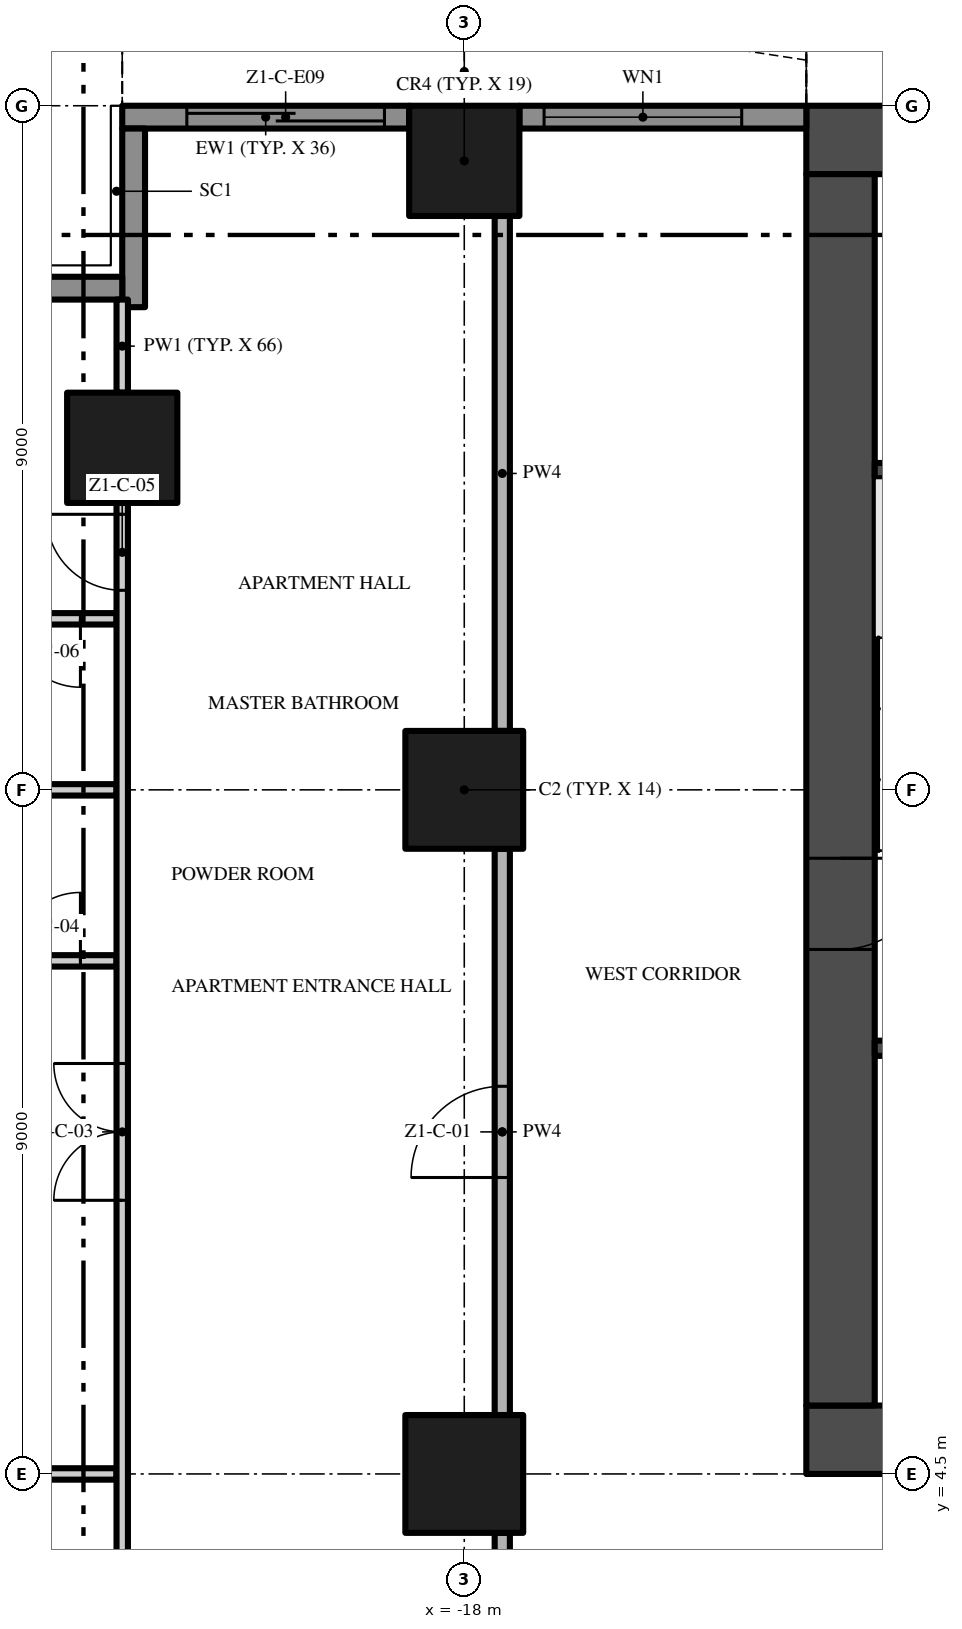
"""IFC4 building model, lengths in metres.
Left out: names, types, materials, properties, quantities, classifications, styles, units other than length and angle.
Written with IfcOpenShell. Run it as: python <this file> out.ifc"""

import sys

from ifc_helpers import new_model, si_unit, direction, frame, frame_2d, origin, origin_2d, place, context, subcontext, project, spatial, polyline, rectangle, outline, extrude, element, fill, save


model = new_model("IFC4")
c1 = context("Model", 3, precision=1e-05, world=origin(), true_north=direction((0.0, 1.0)))
c2 = subcontext(c1, "Body", "Model", "MODEL_VIEW")
j1 = project(units=[si_unit("LENGTHUNIT", "METRE"), si_unit("PLANEANGLEUNIT", "RADIAN")], contexts=[c1])
p1 = place(None, origin())
s1 = spatial("IfcSite", under=j1, at=p1, CompositionType="ELEMENT")
p2 = place(p1, origin())
s2 = spatial("IfcBuilding", under=s1, at=p2, CompositionType="ELEMENT")
p3 = place(p2, frame((0.0, 0.0, 37.8)))
s3 = spatial("IfcBuildingStorey", under=s2, at=p3, CompositionType="ELEMENT", Elevation=37.8)
p4 = place(p3, frame((-13.5, 4.95, -0.3), z_axis=(0.0, 0.0, 1.0), x_axis=(1.0, 0.0, 0.0)))
e1 = element("IfcWall", 1, at=p4, inside=s3, PredefinedType="SHEAR", context=c2, shape_type="SweptSolid", body=[
    extrude(rectangle(XDim=27.0, YDim=0.9, at=frame_2d((13.5, 0.0))), origin(), (0.0, 0.0, 1.0), 3.8),
])
p5 = place(p4, frame((12.0, 0.0, 0.3)))
e2 = element("IfcOpeningElement", 2, at=p5, cuts=e1, PredefinedType="OPENING", context=c2, shape_type="SweptSolid", body=[
    extrude(rectangle(XDim=3.0, YDim=2.4, at=frame_2d((1.5, 1.2))), frame((0.0, 0.46, 0.0), z_axis=(0.0, -1.0, 0.0), x_axis=(1.0, 0.0, 0.0)), (0.0, 0.0, 1.0), 0.92),
])
p6 = place(p4, frame((4.9, 0.0, 0.3)))
e3 = element("IfcOpeningElement", 3, at=p6, cuts=e1, PredefinedType="OPENING", context=c2, shape_type="SweptSolid", body=[
    extrude(rectangle(XDim=1.2, YDim=2.2, at=frame_2d((0.6, 1.1))), frame((0.0, 0.46, 0.0), z_axis=(0.0, -1.0, 0.0), x_axis=(1.0, 0.0, 0.0)), (0.0, 0.0, 1.0), 0.92),
])
p7 = place(p4, frame((20.75, 0.0, 0.3)))
e4 = element("IfcOpeningElement", 4, at=p7, cuts=e1, PredefinedType="OPENING", context=c2, shape_type="SweptSolid", body=[
    extrude(rectangle(XDim=1.5, YDim=2.2, at=frame_2d((0.75, 1.1))), frame((0.0, 0.46, 0.0), z_axis=(0.0, -1.0, 0.0), x_axis=(1.0, 0.0, 0.0)), (0.0, 0.0, 1.0), 0.92),
])
p8 = place(p4, frame((17.4, 0.0, 0.3)))
e5 = element("IfcOpeningElement", 5, at=p8, cuts=e1, PredefinedType="OPENING", context=c2, shape_type="SweptSolid", body=[
    extrude(rectangle(XDim=1.2, YDim=2.2, at=frame_2d((0.6, 1.1))), frame((0.0, 0.46, 0.0), z_axis=(0.0, -1.0, 0.0), x_axis=(1.0, 0.0, 0.0)), (0.0, 0.0, 1.0), 0.92),
])
p9 = place(p3, frame((13.5, 22.05, -0.3), z_axis=(0.0, 0.0, 1.0), x_axis=(-1.0, 0.0, 0.0)))
e6 = element("IfcWall", 6, at=p9, inside=s3, PredefinedType="SHEAR", context=c2, shape_type="SweptSolid", body=[
    extrude(rectangle(XDim=27.0, YDim=0.9, at=frame_2d((13.5, 0.0))), origin(), (0.0, 0.0, 1.0), 3.8),
])
p10 = place(p3, frame((-13.05, 21.6, -0.3), z_axis=(0.0, 0.0, 1.0), x_axis=(0.0, -1.0, 0.0)))
e7 = element("IfcWall", 7, at=p10, inside=s3, PredefinedType="SHEAR", context=c2, shape_type="SweptSolid", body=[
    extrude(rectangle(XDim=16.2, YDim=0.9, at=frame_2d((8.1, 0.0))), origin(), (0.0, 0.0, 1.0), 3.8),
])
p11 = place(p10, frame((9.0, 0.0, 0.3)))
e8 = element("IfcOpeningElement", 8, at=p11, cuts=e7, PredefinedType="OPENING", context=c2, shape_type="SweptSolid", body=[
    extrude(rectangle(XDim=1.2, YDim=2.2, at=frame_2d((0.6, 1.1))), frame((0.0, 0.46, 0.0), z_axis=(0.0, -1.0, 0.0), x_axis=(1.0, 0.0, 0.0)), (0.0, 0.0, 1.0), 0.92),
])
p12 = place(p3, frame((-18.0, 13.5, 0.0), z_axis=(0.0, 0.0, 1.0), x_axis=(1.0, 0.0, 0.0)))
e9 = element("IfcColumn", 9, at=p12, inside=s3, PredefinedType="COLUMN", context=c2, shape_type="SweptSolid", body=[
    extrude(rectangle(XDim=1.55, YDim=1.55, at=origin_2d()), origin(), (0.0, 0.0, 1.0), 3.5),
])
p13 = place(p3, frame((-18.0, 21.775, 0.0), z_axis=(0.0, 0.0, 1.0), x_axis=(1.0, 0.0, 0.0)))
e10 = element("IfcColumn", 10, at=p13, inside=s3, PredefinedType="COLUMN", context=c2, shape_type="SweptSolid", body=[
    extrude(rectangle(XDim=1.45, YDim=1.45, at=origin_2d()), origin(), (0.0, 0.0, 1.0), 3.5),
])
p14 = place(p3, frame((-18.0, 4.5, 0.0), z_axis=(0.0, 0.0, 1.0), x_axis=(1.0, 0.0, 0.0)))
e11 = element("IfcColumn", 11, at=p14, inside=s3, PredefinedType="COLUMN", context=c2, shape_type="SweptSolid", body=[
    extrude(rectangle(XDim=1.55, YDim=1.55, at=origin_2d()), origin(), (0.0, 0.0, 1.0), 3.5),
])
p15 = place(p3, frame((-22.5, 18.0, 0.0), z_axis=(0.0, 0.0, 1.0), x_axis=(1.0, 0.0, 0.0)))
e12 = element("IfcColumn", 12, at=p15, inside=s3, PredefinedType="COLUMN", context=c2, shape_type="SweptSolid", body=[
    extrude(rectangle(XDim=1.45, YDim=1.45, at=origin_2d()), origin(), (0.0, 0.0, 1.0), 3.5),
])
p16 = place(p3, frame((-17.275, 22.35, 0.0), z_axis=(0.0, 0.0, 1.0), x_axis=(1.0, 0.0, 0.0)))
e13 = element("IfcWall", 13, at=p16, inside=s3, PredefinedType="SOLIDWALL", context=c2, shape_type="SweptSolid", body=[
    extrude(rectangle(XDim=3.775, YDim=0.3, at=frame_2d((1.887, 0.0))), origin(), (0.0, 0.0, 1.0), 3.5),
])
p17 = place(p16, frame((0.325, 0.0, 0.45)))
e14 = element("IfcOpeningElement", 14, at=p17, cuts=e13, PredefinedType="OPENING", context=c2, shape_type="SweptSolid", body=[
    extrude(rectangle(XDim=2.6, YDim=2.65, at=frame_2d((1.3, 1.325))), frame((0.0, 0.16, 0.0), z_axis=(0.0, -1.0, 0.0), x_axis=(1.0, 0.0, 0.0)), (0.0, 0.0, 1.0), 0.32),
])
p18 = place(p3, frame((-22.5, 22.35, 0.0), z_axis=(0.0, 0.0, 1.0), x_axis=(1.0, 0.0, 0.0)))
e15 = element("IfcWall", 15, at=p18, inside=s3, PredefinedType="SOLIDWALL", context=c2, shape_type="SweptSolid", body=[
    extrude(rectangle(XDim=3.775, YDim=0.3, at=frame_2d((1.887, 0.0))), origin(), (0.0, 0.0, 1.0), 3.5),
])
p19 = place(p18, frame((0.85, 0.0, 0.0)))
e16 = element("IfcOpeningElement", 16, at=p19, cuts=e15, PredefinedType="OPENING", context=c2, shape_type="SweptSolid", body=[
    extrude(rectangle(XDim=2.6, YDim=2.4, at=frame_2d((1.3, 1.2))), frame((0.0, 0.16, 0.0), z_axis=(0.0, -1.0, 0.0), x_axis=(1.0, 0.0, 0.0)), (0.0, 0.0, 1.0), 0.32),
])
p20 = place(p3, frame((-22.35, 19.85, 0.0), z_axis=(0.0, 0.0, 1.0), x_axis=(0.0, 1.0, 0.0)))
e17 = element("IfcWall", 17, at=p20, inside=s3, PredefinedType="SOLIDWALL", context=c2, shape_type="SweptSolid", body=[
    extrude(rectangle(XDim=2.35, YDim=0.3, at=frame_2d((1.175, 0.0))), origin(), (0.0, 0.0, 1.0), 3.5),
])
p21 = place(p3, frame((-24.75, 20.1, 0.0), z_axis=(0.0, 0.0, 1.0), x_axis=(1.0, 0.0, 0.0)))
e18 = element("IfcWall", 18, at=p21, inside=s3, PredefinedType="SOLIDWALL", context=c2, shape_type="SweptSolid", body=[
    extrude(rectangle(XDim=2.25, YDim=0.3, at=frame_2d((1.125, 0.0))), origin(), (0.0, 0.0, 1.0), 3.5),
])
p22 = place(p3, origin())
e19 = element("IfcWall", 19, at=p22, inside=s3, PredefinedType="USERDEFINED", context=c2, shape_type="SweptSolid", body=[
    extrude(outline(polyline([(-13.5, 23.1), (-15.0, 23.329), (-16.5, 23.929), (-18.0, 24.671), (-19.5, 25.271), (-21.0, 25.5), (-22.5, 25.271), (-22.462, 25.024), (-21.0, 25.247), (-19.566, 25.028), (-18.102, 24.442), (-16.602, 23.701), (-15.066, 23.086), (-13.538, 22.853), (-13.5, 23.1)])), origin(), (0.0, 0.0, 1.0), 0.9),
])
for number, where, z_axis, x_axis in (
    (20, (-12.6, 10.1, 0.0), (0.0, 0.0, 1.0), (1.0, 0.0, 0.0)),
    (21, (-12.6, 17.7, 0.0), (0.0, 0.0, 1.0), (1.0, 0.0, 0.0)),
):
    element("IfcWall", number, at=place(p3, frame(where, z_axis=z_axis, x_axis=x_axis)), inside=s3, PredefinedType="SHEAR", context=c2, shape_type="SweptSolid", body=[
        extrude(rectangle(XDim=2.95, YDim=0.2, at=frame_2d((1.475, 0.0))), origin(), (0.0, 0.0, 1.0), 3.5),
    ])
p23 = place(p3, frame((-25.55, 4.5, 0.0), z_axis=(0.0, 0.0, 1.0), x_axis=(1.0, 0.0, 0.0)))
e22 = element("IfcWall", 22, at=p23, inside=s3, PredefinedType="PARTITIONING", context=c2, shape_type="SweptSolid", body=[
    extrude(rectangle(XDim=2.975, YDim=0.15, at=frame_2d((1.488, 0.0))), origin(), (0.0, 0.0, 1.0), 3.5),
])
p24 = place(p3, frame((-24.45, 11.25, 0.0), z_axis=(0.0, 0.0, 1.0), x_axis=(1.0, 0.0, 0.0)))
e23 = element("IfcWall", 23, at=p24, inside=s3, PredefinedType="PARTITIONING", context=c2, shape_type="SweptSolid", body=[
    extrude(rectangle(XDim=1.875, YDim=0.15, at=frame_2d((0.938, 0.0))), origin(), (0.0, 0.0, 1.0), 3.5),
])
p25 = place(p24, frame((0.5, 0.0, 0.0)))
e24 = element("IfcOpeningElement", 24, at=p25, cuts=e23, PredefinedType="OPENING", context=c2, shape_type="SweptSolid", body=[
    extrude(rectangle(XDim=0.9, YDim=2.1, at=frame_2d((0.45, 1.05))), frame((0.0, 0.085, 0.0), z_axis=(0.0, -1.0, 0.0), x_axis=(1.0, 0.0, 0.0)), (0.0, 0.0, 1.0), 0.17),
])
p26 = place(p3, frame((-24.45, 13.5, 0.0), z_axis=(0.0, 0.0, 1.0), x_axis=(1.0, 0.0, 0.0)))
e25 = element("IfcWall", 25, at=p26, inside=s3, PredefinedType="PARTITIONING", context=c2, shape_type="SweptSolid", body=[
    extrude(rectangle(XDim=1.875, YDim=0.15, at=frame_2d((0.938, 0.0))), origin(), (0.0, 0.0, 1.0), 3.5),
])
p27 = place(p3, frame((-22.575, 15.75, 0.0), z_axis=(0.0, 0.0, 1.0), x_axis=(-1.0, 0.0, 0.0)))
e26 = element("IfcWall", 26, at=p27, inside=s3, PredefinedType="PARTITIONING", context=c2, shape_type="SweptSolid", body=[
    extrude(rectangle(XDim=1.875, YDim=0.15, at=frame_2d((0.938, 0.0))), origin(), (0.0, 0.0, 1.0), 3.5),
])
p28 = place(p27, frame((0.475, 0.0, 0.0)))
e27 = element("IfcOpeningElement", 27, at=p28, cuts=e26, PredefinedType="OPENING", context=c2, shape_type="SweptSolid", body=[
    extrude(rectangle(XDim=0.9, YDim=2.1, at=frame_2d((0.45, 1.05))), frame((0.0, 0.085, 0.0), z_axis=(0.0, -1.0, 0.0), x_axis=(1.0, 0.0, 0.0)), (0.0, 0.0, 1.0), 0.17),
])
p29 = place(p3, frame((-22.5, 0.1, 0.0), z_axis=(0.0, 0.0, 1.0), x_axis=(0.0, 1.0, 0.0)))
e28 = element("IfcWall", 28, at=p29, inside=s3, PredefinedType="PARTITIONING", context=c2, shape_type="SweptSolid", body=[
    extrude(rectangle(XDim=17.175, YDim=0.15, at=frame_2d((8.588, 0.0))), origin(), (0.0, 0.0, 1.0), 3.5),
])
p30 = place(p29, frame((1.65, 0.0, 0.0)))
e29 = element("IfcOpeningElement", 29, at=p30, cuts=e28, PredefinedType="OPENING", context=c2, shape_type="SweptSolid", body=[
    extrude(rectangle(XDim=1.0, YDim=2.4, at=frame_2d((0.5, 1.2))), frame((0.0, 0.085, 0.0), z_axis=(0.0, -1.0, 0.0), x_axis=(1.0, 0.0, 0.0)), (0.0, 0.0, 1.0), 0.17),
])
p31 = place(p29, frame((8.0, 0.0, 0.0)))
e30 = element("IfcOpeningElement", 30, at=p31, cuts=e28, PredefinedType="OPENING", context=c2, shape_type="SweptSolid", body=[
    extrude(rectangle(XDim=1.8, YDim=2.4, at=frame_2d((0.9, 1.2))), frame((0.0, 0.085, 0.0), z_axis=(0.0, -1.0, 0.0), x_axis=(1.0, 0.0, 0.0)), (0.0, 0.0, 1.0), 0.17),
])
p32 = place(p29, frame((16.025, 0.0, 0.0)))
e31 = element("IfcOpeningElement", 31, at=p32, cuts=e28, PredefinedType="OPENING", context=c2, shape_type="SweptSolid", body=[
    extrude(rectangle(XDim=1.0, YDim=2.4, at=frame_2d((0.5, 1.2))), frame((0.0, 0.085, 0.0), z_axis=(0.0, -1.0, 0.0), x_axis=(1.0, 0.0, 0.0)), (0.0, 0.0, 1.0), 0.17),
])
p33 = place(p3, frame((-22.5, 18.725, 0.0), z_axis=(0.0, 0.0, 1.0), x_axis=(0.0, 1.0, 0.0)))
e32 = element("IfcWall", 32, at=p33, inside=s3, PredefinedType="PARTITIONING", context=c2, shape_type="SweptSolid", body=[
    extrude(rectangle(XDim=1.225, YDim=0.15, at=frame_2d((0.613, 0.0))), origin(), (0.0, 0.0, 1.0), 3.5),
])
p34 = place(p3, frame((-17.5, -0.2, 0.0), z_axis=(0.0, 0.0, 1.0), x_axis=(0.0, 1.0, 0.0)))
e33 = element("IfcWall", 33, at=p34, inside=s3, PredefinedType="PARTITIONING", context=c2, shape_type="SweptSolid", body=[
    extrude(rectangle(XDim=3.925, YDim=0.2, at=frame_2d((1.962, 0.0))), origin(), (0.0, 0.0, 1.0), 3.5),
])
p35 = place(p3, frame((-17.5, 5.275, 0.0), z_axis=(0.0, 0.0, 1.0), x_axis=(0.0, 1.0, 0.0)))
e34 = element("IfcWall", 34, at=p35, inside=s3, PredefinedType="PARTITIONING", context=c2, shape_type="SweptSolid", body=[
    extrude(rectangle(XDim=7.45, YDim=0.2, at=frame_2d((3.725, 0.0))), origin(), (0.0, 0.0, 1.0), 3.5),
])
p36 = place(p35, frame((3.125, 0.0, 0.0)))
e35 = element("IfcOpeningElement", 35, at=p36, cuts=e34, PredefinedType="OPENING", context=c2, shape_type="SweptSolid", body=[
    extrude(rectangle(XDim=1.2, YDim=2.4, at=frame_2d((0.6, 1.2))), frame((0.0, 0.11, 0.0), z_axis=(0.0, -1.0, 0.0), x_axis=(1.0, 0.0, 0.0)), (0.0, 0.0, 1.0), 0.22),
])
p37 = place(p3, frame((-17.5, 14.275, 0.0), z_axis=(0.0, 0.0, 1.0), x_axis=(0.0, 1.0, 0.0)))
e36 = element("IfcWall", 36, at=p37, inside=s3, PredefinedType="PARTITIONING", context=c2, shape_type="SweptSolid", body=[
    extrude(rectangle(XDim=6.775, YDim=0.2, at=frame_2d((3.388, 0.0))), origin(), (0.0, 0.0, 1.0), 3.5),
])
p38 = place(p17, origin())
e37 = element("IfcWindow", 37, at=p38, inside=s3, PartitioningType="SINGLE_PANEL", PredefinedType="WINDOW", context=c2, shape_type="SweptSolid", body=[
    extrude(rectangle(XDim=2.6, YDim=2.65, at=frame_2d((1.3, 1.325))), frame((0.0, 0.03, 0.0), z_axis=(0.0, -1.0, 0.0), x_axis=(1.0, 0.0, 0.0)), (0.0, 0.0, 1.0), 0.06),
])
fill(e14, e37)
p39 = place(p19, origin())
e38 = element("IfcDoor", 38, at=p39, inside=s3, OperationType="SINGLE_SWING_LEFT", PredefinedType="DOOR", context=c2, shape_type="SweptSolid", body=[
    extrude(rectangle(XDim=2.6, YDim=2.4, at=frame_2d((1.3, 1.2))), frame((0.0, 0.025, 0.0), z_axis=(0.0, -1.0, 0.0), x_axis=(1.0, 0.0, 0.0)), (0.0, 0.0, 1.0), 0.05),
])
fill(e16, e38)
p40 = place(p11, frame((1.2, 0.0, 0.0), z_axis=(0.0, 0.0, 1.0), x_axis=(-1.0, 0.0, 0.0)))
e39 = element("IfcDoor", 39, at=p40, inside=s3, OperationType="SINGLE_SWING_RIGHT", PredefinedType="DOOR", context=c2, shape_type="SweptSolid", body=[
    extrude(rectangle(XDim=1.2, YDim=2.2, at=frame_2d((0.6, 1.1))), frame((0.0, 0.025, 0.0), z_axis=(0.0, -1.0, 0.0), x_axis=(1.0, 0.0, 0.0)), (0.0, 0.0, 1.0), 0.05),
])
fill(e8, e39)
p41 = place(p36, origin())
e40 = element("IfcDoor", 40, at=p41, inside=s3, OperationType="SINGLE_SWING_LEFT", PredefinedType="DOOR", context=c2, shape_type="SweptSolid", body=[
    extrude(rectangle(XDim=1.2, YDim=2.4, at=frame_2d((0.6, 1.2))), frame((0.0, 0.025, 0.0), z_axis=(0.0, -1.0, 0.0), x_axis=(1.0, 0.0, 0.0)), (0.0, 0.0, 1.0), 0.05),
])
fill(e35, e40)
p42 = place(p31, origin())
e41 = element("IfcDoor", 41, at=p42, inside=s3, OperationType="DOUBLE_DOOR_SINGLE_SWING", PredefinedType="DOOR", context=c2, shape_type="SweptSolid", body=[
    extrude(rectangle(XDim=1.8, YDim=2.4, at=frame_2d((0.9, 1.2))), frame((0.0, 0.025, 0.0), z_axis=(0.0, -1.0, 0.0), x_axis=(1.0, 0.0, 0.0)), (0.0, 0.0, 1.0), 0.05),
])
fill(e30, e41)
p43 = place(p25, origin())
e42 = element("IfcDoor", 42, at=p43, inside=s3, OperationType="SINGLE_SWING_RIGHT", PredefinedType="DOOR", context=c2, shape_type="SweptSolid", body=[
    extrude(rectangle(XDim=0.9, YDim=2.1, at=frame_2d((0.45, 1.05))), frame((0.0, 0.025, 0.0), z_axis=(0.0, -1.0, 0.0), x_axis=(1.0, 0.0, 0.0)), (0.0, 0.0, 1.0), 0.05),
])
fill(e24, e42)
p44 = place(p32, origin())
e43 = element("IfcDoor", 43, at=p44, inside=s3, OperationType="SINGLE_SWING_RIGHT", PredefinedType="DOOR", context=c2, shape_type="SweptSolid", body=[
    extrude(rectangle(XDim=1.0, YDim=2.4, at=frame_2d((0.5, 1.2))), frame((0.0, 0.025, 0.0), z_axis=(0.0, -1.0, 0.0), x_axis=(1.0, 0.0, 0.0)), (0.0, 0.0, 1.0), 0.05),
])
fill(e31, e43)
p45 = place(p28, origin())
e44 = element("IfcDoor", 44, at=p45, inside=s3, OperationType="SINGLE_SWING_LEFT", PredefinedType="DOOR", context=c2, shape_type="SweptSolid", body=[
    extrude(rectangle(XDim=0.9, YDim=2.1, at=frame_2d((0.45, 1.05))), frame((0.0, 0.025, 0.0), z_axis=(0.0, -1.0, 0.0), x_axis=(1.0, 0.0, 0.0)), (0.0, 0.0, 1.0), 0.05),
])
fill(e27, e44)
save(model, sys.argv[1])
